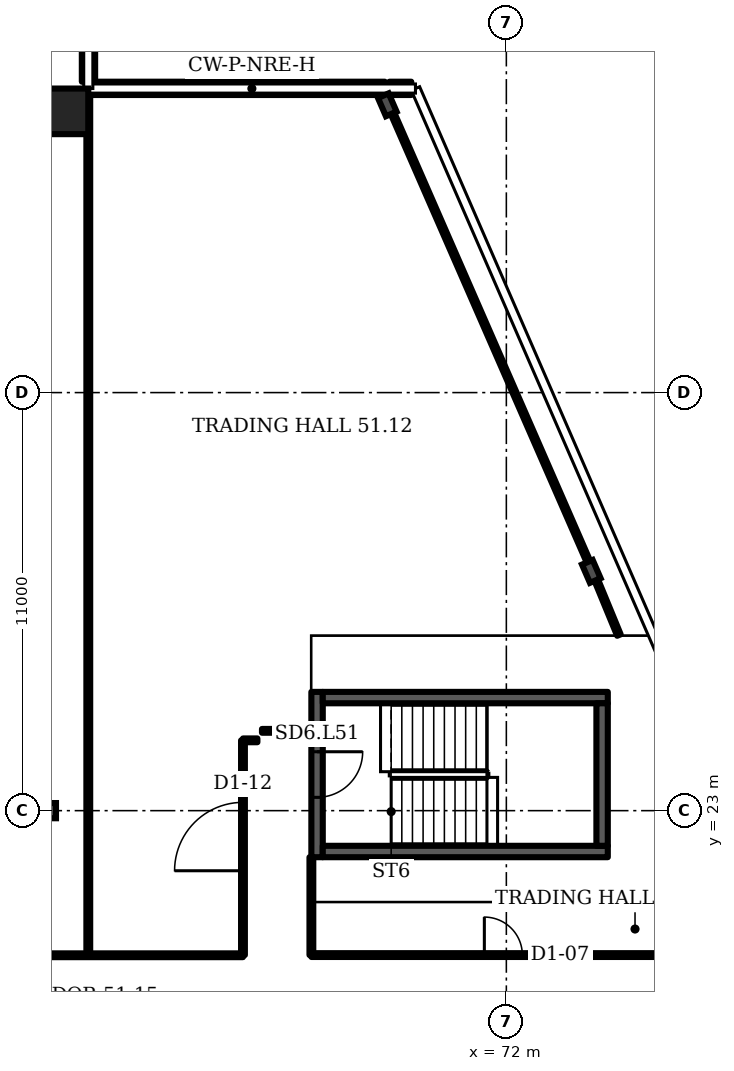
"""IFC4 building model, lengths in metres.
Left out: names, types, materials, properties, quantities, classifications, styles, units other than length and angle.
Written with IfcOpenShell. Run it as: python <this file> out.ifc"""

import sys

from ifc_helpers import new_model, si_unit, direction, frame, frame_2d, origin, origin_2d, place, context, subcontext, project, spatial, rectangle, i_section, extrude, element, fill, save


model = new_model("IFC4")
c1 = context("Model", 3, precision=1e-05, world=origin(), true_north=direction((0.0, 1.0)))
c2 = subcontext(c1, "Body", "Model", "MODEL_VIEW")
j1 = project(units=[si_unit("LENGTHUNIT", "METRE"), si_unit("PLANEANGLEUNIT", "RADIAN")], contexts=[c1])
p1 = place(None, origin())
s1 = spatial("IfcSite", under=j1, at=p1, CompositionType="ELEMENT")
p2 = place(p1, origin())
s2 = spatial("IfcBuilding", under=s1, at=p2, CompositionType="ELEMENT")
p3 = place(p2, frame((0.0, 0.0, 207.1)))
s3 = spatial("IfcBuildingStorey", under=s2, at=p3, CompositionType="ELEMENT", Elevation=207.1)
p4 = place(p3, frame((60.4, 41.4, 0.0), z_axis=(0.0, 0.0, 1.0), x_axis=(1.0, 0.0, 0.0)))
e1 = element("IfcColumn", 1, at=p4, inside=s3, PredefinedType="COLUMN", context=c2, shape_type="SweptSolid", body=[
    extrude(rectangle(XDim=1.2, YDim=1.2, at=origin_2d()), origin(), (0.0, 0.0, 1.0), 3.6),
])
for number, where, z_axis, x_axis in (
    (2, (74.235, 29.295, 0.0), (0.0, 0.0, 1.0), (0.917, 0.399, 0.0)),
    (3, (68.867, 41.572, 0.0), (0.0, 0.0, 1.0), (0.917, 0.399, 0.0)),
):
    element("IfcColumn", number, at=place(p3, frame(where, z_axis=z_axis, x_axis=x_axis)), inside=s3, PredefinedType="COLUMN", context=c2, shape_type="SweptSolid", body=[
        extrude(i_section(OverallWidth=0.306, OverallDepth=0.524, WebThickness=0.021, FlangeThickness=0.04, FilletRadius=0.027, at=origin_2d()), origin(), (0.0, 0.0, 1.0), 3.6),
    ])
p5 = place(p3, frame((60.0, 23.0, 0.0), z_axis=(0.0, 0.0, 1.0), x_axis=(1.0, 0.0, 0.0)))
e4 = element("IfcColumn", 4, at=p5, inside=s3, PredefinedType="COLUMN", context=c2, shape_type="SweptSolid", body=[
    extrude(i_section(OverallWidth=0.3, OverallDepth=0.4, WebThickness=0.013, FlangeThickness=0.024, FilletRadius=0.027, at=origin_2d()), origin(), (0.0, 0.0, 1.0), 3.6),
])
p6 = place(p3, frame((69.499, 42.005, 0.0), z_axis=(0.0, 0.0, 1.0), x_axis=(-1.0, 0.0, 0.0)))
e5 = element("IfcWall", 5, at=p6, inside=s3, PredefinedType="SOLIDWALL", context=c2, shape_type="SweptSolid", body=[
    extrude(rectangle(XDim=0.577, YDim=0.35, at=frame_2d((0.288, 0.0))), origin(), (0.0, 0.0, 1.0), 1.0),
])
p7 = place(p3, frame((68.803, 42.005, 0.0), z_axis=(0.0, 0.0, 1.0), x_axis=(-1.0, 0.0, 0.0)))
e6 = element("IfcWall", 6, at=p7, inside=s3, PredefinedType="SOLIDWALL", context=c2, shape_type="SweptSolid", body=[
    extrude(rectangle(XDim=7.803, YDim=0.35, at=frame_2d((3.902, 0.0))), origin(), (0.0, 0.0, 1.0), 1.0),
])
p8 = place(p3, frame((61.005, 42.18, 0.0), z_axis=(0.0, 0.0, 1.0), x_axis=(0.0, 1.0, 0.0)))
e7 = element("IfcWall", 7, at=p8, inside=s3, PredefinedType="SOLIDWALL", context=c2, shape_type="SweptSolid", body=[
    extrude(rectangle(XDim=5.947, YDim=0.35, at=frame_2d((2.973, 0.0))), origin(), (0.0, 0.0, 1.0), 1.0),
])
p9 = place(p3, frame((67.02, 21.775, 0.0), z_axis=(0.0, 0.0, 1.0), x_axis=(0.0, 1.0, 0.0)))
e8 = element("IfcWall", 8, at=p9, inside=s3, PredefinedType="SHEAR", context=c2, shape_type="SweptSolid", body=[
    extrude(rectangle(XDim=4.35, YDim=0.3, at=frame_2d((2.175, 0.0))), origin(), (0.0, 0.0, 1.0), 3.2),
])
p10 = place(p9, frame((1.575, 0.0, 0.0)))
e9 = element("IfcOpeningElement", 9, at=p10, cuts=e8, PredefinedType="OPENING", context=c2, shape_type="SweptSolid", body=[
    extrude(rectangle(XDim=1.2, YDim=2.1, at=frame_2d((0.6, 1.05))), frame((0.0, 0.16, 0.0), z_axis=(0.0, -1.0, 0.0), x_axis=(1.0, 0.0, 0.0)), (0.0, 0.0, 1.0), 0.32),
])
p11 = place(p3, frame((24.805, 19.195, 0.0), z_axis=(0.0, 0.0, 1.0), x_axis=(1.0, 0.0, 0.0)))
e10 = element("IfcWall", 10, at=p11, inside=s3, PredefinedType="PARTITIONING", context=c2, shape_type="SweptSolid", body=[
    extrude(rectangle(XDim=40.265, YDim=0.1, at=frame_2d((20.133, 0.0))), origin(), (0.0, 0.0, 1.0), 3.2),
])
p12 = place(p11, frame((4.945, 0.0, 0.0)))
e11 = element("IfcOpeningElement", 11, at=p12, cuts=e10, PredefinedType="OPENING", context=c2, shape_type="SweptSolid", body=[
    extrude(rectangle(XDim=1.0, YDim=2.1, at=frame_2d((0.5, 1.05))), frame((0.0, 0.06, 0.0), z_axis=(0.0, -1.0, 0.0), x_axis=(1.0, 0.0, 0.0)), (0.0, 0.0, 1.0), 0.12),
])
p13 = place(p11, frame((30.57, 0.0, 0.0)))
e12 = element("IfcOpeningElement", 12, at=p13, cuts=e10, PredefinedType="OPENING", context=c2, shape_type="SweptSolid", body=[
    extrude(rectangle(XDim=1.0, YDim=2.1, at=frame_2d((0.5, 1.05))), frame((0.0, 0.06, 0.0), z_axis=(0.0, -1.0, 0.0), x_axis=(1.0, 0.0, 0.0)), (0.0, 0.0, 1.0), 0.12),
])
p14 = place(p11, frame((16.02, 0.0, 0.0)))
e13 = element("IfcOpeningElement", 13, at=p14, cuts=e10, PredefinedType="OPENING", context=c2, shape_type="SweptSolid", body=[
    extrude(rectangle(XDim=1.1, YDim=2.1, at=frame_2d((0.55, 1.05))), frame((0.0, 0.06, 0.0), z_axis=(0.0, -1.0, 0.0), x_axis=(1.0, 0.0, 0.0)), (0.0, 0.0, 1.0), 0.12),
])
p15 = place(p3, frame((61.0, 19.2, 0.0), z_axis=(0.0, 0.0, 1.0), x_axis=(0.0, 1.0, 0.0)))
e14 = element("IfcWall", 14, at=p15, inside=s3, PredefinedType="PARTITIONING", context=c2, shape_type="SweptSolid", body=[
    extrude(rectangle(XDim=22.78, YDim=0.1, at=frame_2d((11.39, 0.0))), origin(), (0.0, 0.0, 1.0), 3.2),
])
p16 = place(p3, frame((65.07, 19.2, 0.0), z_axis=(0.0, 0.0, 1.0), x_axis=(0.0, 1.0, 0.0)))
e15 = element("IfcWall", 15, at=p16, inside=s3, PredefinedType="PARTITIONING", context=c2, shape_type="SweptSolid", body=[
    extrude(rectangle(XDim=5.65, YDim=0.1, at=frame_2d((2.825, 0.0))), origin(), (0.0, 0.0, 1.0), 3.2),
])
p17 = place(p16, frame((2.219, 0.0, 0.0)))
e16 = element("IfcOpeningElement", 16, at=p17, cuts=e15, PredefinedType="OPENING", context=c2, shape_type="SweptSolid", body=[
    extrude(rectangle(XDim=1.8, YDim=2.1, at=frame_2d((0.9, 1.05))), frame((0.0, 0.06, 0.0), z_axis=(0.0, -1.0, 0.0), x_axis=(1.0, 0.0, 0.0)), (0.0, 0.0, 1.0), 0.12),
])
p18 = place(p3, frame((65.07, 24.85, 0.0), z_axis=(0.0, 0.0, 1.0), x_axis=(1.0, 0.0, 0.0)))
e17 = element("IfcWall", 17, at=p18, inside=s3, PredefinedType="PARTITIONING", context=c2, shape_type="SweptSolid", body=[
    extrude(rectangle(XDim=0.38, YDim=0.1, at=frame_2d((0.19, 0.0))), origin(), (0.0, 0.0, 1.0), 3.2),
])
p19 = place(p3, frame((65.57, 25.1, 0.0), z_axis=(0.0, 0.0, 1.0), x_axis=(1.0, 0.0, 0.0)))
e18 = element("IfcWall", 18, at=p19, inside=s3, PredefinedType="PARTITIONING", context=c2, shape_type="SweptSolid", body=[
    extrude(rectangle(XDim=1.28, YDim=0.1, at=frame_2d((0.64, 0.0))), origin(), (0.0, 0.0, 1.0), 3.2),
])
p20 = place(p3, frame((66.87, 19.2, 0.0), z_axis=(0.0, 0.0, 1.0), x_axis=(0.0, 1.0, 0.0)))
e19 = element("IfcWall", 19, at=p20, inside=s3, PredefinedType="PARTITIONING", context=c2, shape_type="SweptSolid", body=[
    extrude(rectangle(XDim=2.575, YDim=0.1, at=frame_2d((1.288, 0.0))), origin(), (0.0, 0.0, 1.0), 3.2),
])
p21 = place(p3, frame((66.87, 19.2, 0.0), z_axis=(0.0, 0.0, 1.0), x_axis=(1.0, 0.0, 0.0)))
e20 = element("IfcWall", 20, at=p21, inside=s3, PredefinedType="PARTITIONING", context=c2, shape_type="SweptSolid", body=[
    extrude(rectangle(XDim=11.57, YDim=0.1, at=frame_2d((5.785, 0.0))), origin(), (0.0, 0.0, 1.0), 3.2),
])
p22 = place(p21, frame((4.551, 0.0, 0.0)))
e21 = element("IfcOpeningElement", 21, at=p22, cuts=e20, PredefinedType="OPENING", context=c2, shape_type="SweptSolid", body=[
    extrude(rectangle(XDim=1.0, YDim=2.1, at=frame_2d((0.5, 1.05))), frame((0.0, 0.06, 0.0), z_axis=(0.0, -1.0, 0.0), x_axis=(1.0, 0.0, 0.0)), (0.0, 0.0, 1.0), 0.12),
])
p23 = place(p3, frame((74.265, 29.31, 0.0), z_axis=(0.0, 0.0, 1.0), x_axis=(-0.400401, 0.916335, 0.0)))
e22 = element("IfcWall", 22, at=p23, inside=s3, PredefinedType="PARTITIONING", context=c2, shape_type="SweptSolid", body=[
    extrude(rectangle(XDim=13.795, YDim=0.1, at=frame_2d((6.897, 0.0))), origin(), (0.0, 0.0, 1.0), 2.58),
])
p24 = place(p3, frame((74.962, 27.62, 0.0), z_axis=(0.0, 0.0, 1.0), x_axis=(-0.381293, 0.924452, 0.0)))
e23 = element("IfcWall", 23, at=p24, inside=s3, PredefinedType="PARTITIONING", context=c2, shape_type="SweptSolid", body=[
    extrude(rectangle(XDim=1.828, YDim=0.1, at=frame_2d((0.914, 0.0))), origin(), (0.0, 0.0, 1.0), 2.58),
])
for number, where, z_axis, x_axis in (
    (24, (67.17, 21.925, 0.0), (0.0, 0.0, 1.0), (1.0, 0.0, 0.0)),
    (25, (67.17, 25.975, 0.0), (0.0, 0.0, 1.0), (1.0, 0.0, 0.0)),
):
    element("IfcWall", number, at=place(p3, frame(where, z_axis=z_axis, x_axis=x_axis)), inside=s3, PredefinedType="SHEAR", context=c2, shape_type="SweptSolid", body=[
        extrude(rectangle(XDim=7.5, YDim=0.3, at=frame_2d((3.75, 0.0))), origin(), (0.0, 0.0, 1.0), 3.2),
    ])
p25 = place(p3, frame((74.52, 22.075, 0.0), z_axis=(0.0, 0.0, 1.0), x_axis=(0.0, 1.0, 0.0)))
e26 = element("IfcWall", 26, at=p25, inside=s3, PredefinedType="SHEAR", context=c2, shape_type="SweptSolid", body=[
    extrude(rectangle(XDim=3.75, YDim=0.3, at=frame_2d((1.875, 0.0))), origin(), (0.0, 0.0, 1.0), 3.2),
])
p26 = place(p10, origin())
e27 = element("IfcDoor", 27, at=p26, inside=s3, OperationType="SINGLE_SWING_RIGHT", PredefinedType="DOOR", context=c2, shape_type="SweptSolid", body=[
    extrude(rectangle(XDim=1.2, YDim=2.1, at=frame_2d((0.6, 1.05))), frame((0.0, 0.025, 0.0), z_axis=(0.0, -1.0, 0.0), x_axis=(1.0, 0.0, 0.0)), (0.0, 0.0, 1.0), 0.05),
])
fill(e9, e27)
p27 = place(p22, origin())
e28 = element("IfcDoor", 28, at=p27, inside=s3, OperationType="SINGLE_SWING_LEFT", PredefinedType="DOOR", context=c2, shape_type="SweptSolid", body=[
    extrude(rectangle(XDim=1.0, YDim=2.1, at=frame_2d((0.5, 1.05))), frame((0.0, 0.025, 0.0), z_axis=(0.0, -1.0, 0.0), x_axis=(1.0, 0.0, 0.0)), (0.0, 0.0, 1.0), 0.05),
])
fill(e21, e28)
p28 = place(p17, origin())
e29 = element("IfcDoor", 29, at=p28, inside=s3, OperationType="DOUBLE_DOOR_SINGLE_SWING", PredefinedType="DOOR", context=c2, shape_type="SweptSolid", body=[
    extrude(rectangle(XDim=1.8, YDim=2.1, at=frame_2d((0.9, 1.05))), frame((0.0, 0.025, 0.0), z_axis=(0.0, -1.0, 0.0), x_axis=(1.0, 0.0, 0.0)), (0.0, 0.0, 1.0), 0.05),
])
fill(e16, e29)
save(model, sys.argv[1])
